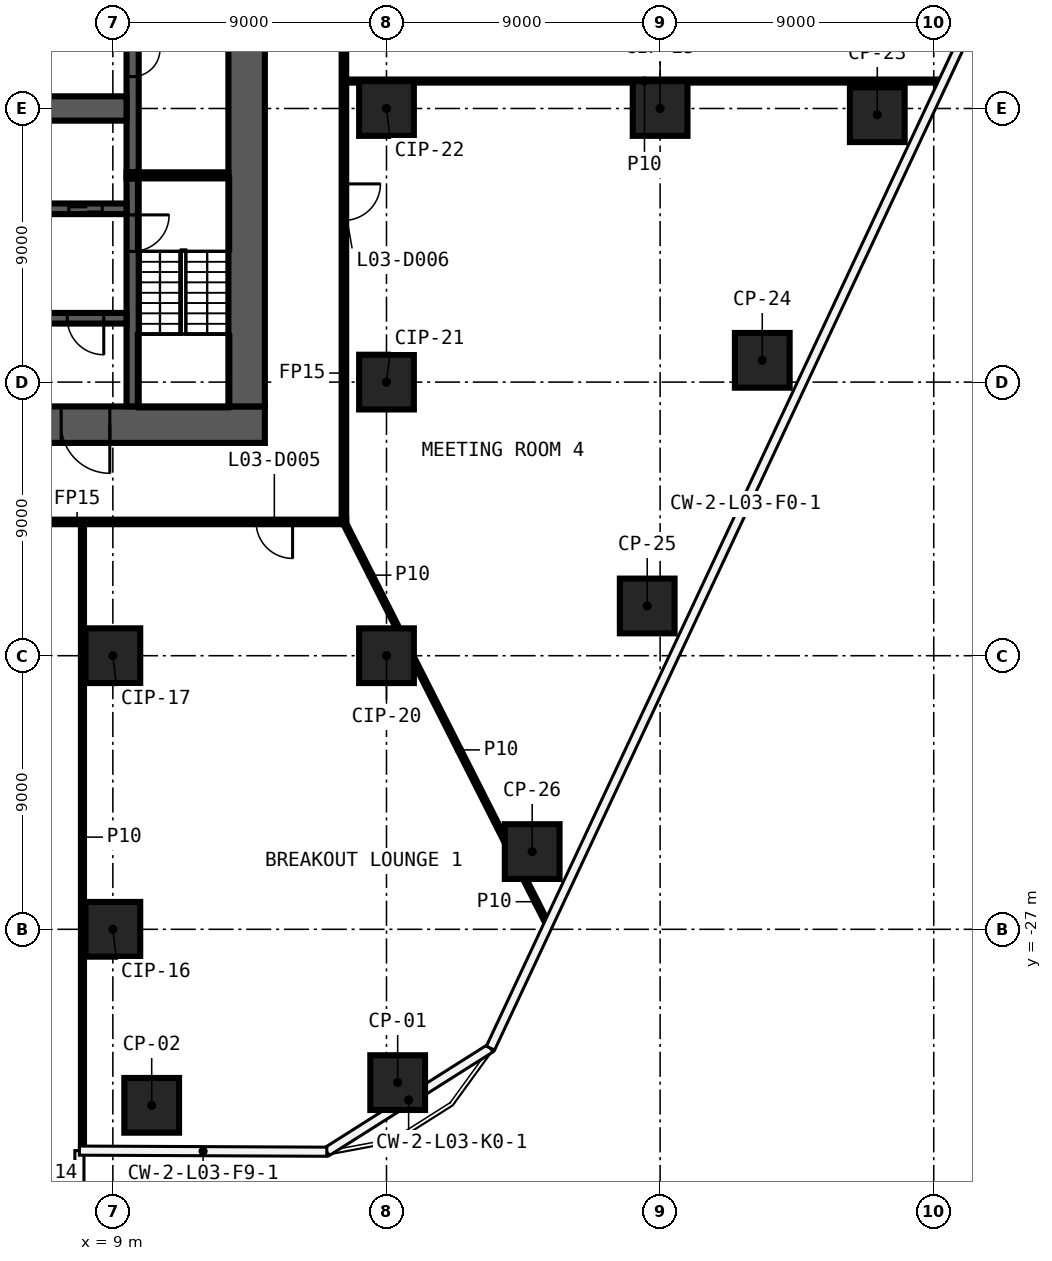
"""IFC4 building model, lengths in metres.
Left out: names, types, materials, properties, quantities, classifications, styles, units other than length and angle.
Written with IfcOpenShell. Run it as: python <this file> out.ifc"""

import sys

from ifc_helpers import new_model, si_unit, direction, frame, frame_2d, origin, origin_2d, place, context, subcontext, project, spatial, rectangle, extrude, element, fill, save


model = new_model("IFC4")
c1 = context("Model", 3, precision=1e-05, world=origin(), true_north=direction((0.0, 1.0)))
c2 = subcontext(c1, "Body", "Model", "MODEL_VIEW")
j1 = project(units=[si_unit("LENGTHUNIT", "METRE"), si_unit("PLANEANGLEUNIT", "RADIAN")], contexts=[c1])
p1 = place(None, origin())
s1 = spatial("IfcSite", under=j1, at=p1, CompositionType="ELEMENT")
p2 = place(p1, origin())
s2 = spatial("IfcBuilding", under=s1, at=p2, CompositionType="ELEMENT")
p3 = place(p2, frame((0.0, 0.0, 27.0)))
s3 = spatial("IfcBuildingStorey", under=s2, at=p3, CompositionType="ELEMENT", Elevation=27.0)
for number, where, z_axis, x_axis in (
    (1, (18.368, -32.043, 0.0), (0.0, 0.0, 1.0), (1.0, 0.0, 0.0)),
    (2, (10.277, -32.79, 0.0), (0.0, 0.0, 1.0), (1.0, 0.0, 0.0)),
    (3, (34.143, -0.205, 0.0), (0.0, 0.0, 1.0), (1.0, 0.0, 0.0)),
    (4, (30.36, -8.284, 0.0), (0.0, 0.0, 1.0), (1.0, 0.0, 0.0)),
    (5, (26.576, -16.364, 0.0), (0.0, 0.0, 1.0), (1.0, 0.0, 0.0)),
    (6, (22.792, -24.443, 0.0), (0.0, 0.0, 1.0), (1.0, 0.0, 0.0)),
    (7, (9.0, -27.0, 0.0), (0.0, 0.0, 1.0), (1.0, 0.0, 0.0)),
    (8, (9.0, -18.0, 0.0), (0.0, 0.0, 1.0), (1.0, 0.0, 0.0)),
    (9, (18.0, -18.0, 0.0), (0.0, 0.0, 1.0), (1.0, 0.0, 0.0)),
    (10, (18.0, -9.0, 0.0), (0.0, 0.0, 1.0), (1.0, 0.0, 0.0)),
    (11, (18.0, 0.0, 0.0), (0.0, 0.0, 1.0), (1.0, 0.0, 0.0)),
    (12, (27.0, 0.0, 0.0), (0.0, 0.0, 1.0), (1.0, 0.0, 0.0)),
):
    element("IfcColumn", number, at=place(p3, frame(where, z_axis=z_axis, x_axis=x_axis)), inside=s3, PredefinedType="COLUMN", context=c2, shape_type="SweptSolid", body=[
        extrude(rectangle(XDim=1.8, YDim=1.8, at=origin_2d()), origin(), (0.0, 0.0, 1.0), 5.55),
    ])
p4 = place(p3, frame((16.675, -13.6, 0.0), z_axis=(0.0, 0.0, 1.0), x_axis=(-1.0, 0.0, 0.0)))
e13 = element("IfcWall", 13, at=p4, inside=s3, PredefinedType="PARTITIONING", context=c2, shape_type="SweptSolid", body=[
    extrude(rectangle(XDim=33.35, YDim=0.15, at=frame_2d((16.675, 0.0))), origin(), (0.0, 0.0, 1.0), 5.55),
])
p5 = place(p4, frame((25.853, 0.0, 0.0)))
e14 = element("IfcOpeningElement", 14, at=p5, cuts=e13, PredefinedType="OPENING", context=c2, shape_type="SweptSolid", body=[
    extrude(rectangle(XDim=1.2, YDim=2.1, at=frame_2d((0.6, 1.05))), frame((0.0, 0.085, 0.0), z_axis=(0.0, -1.0, 0.0), x_axis=(1.0, 0.0, 0.0)), (0.0, 0.0, 1.0), 0.17),
])
p6 = place(p4, frame((14.742, 0.0, 0.0)))
e15 = element("IfcOpeningElement", 15, at=p6, cuts=e13, PredefinedType="OPENING", context=c2, shape_type="SweptSolid", body=[
    extrude(rectangle(XDim=1.2, YDim=2.1, at=frame_2d((0.6, 1.05))), frame((0.0, 0.085, 0.0), z_axis=(0.0, -1.0, 0.0), x_axis=(1.0, 0.0, 0.0)), (0.0, 0.0, 1.0), 0.17),
])
p7 = place(p4, frame((1.764, 0.0, 0.0)))
e16 = element("IfcOpeningElement", 16, at=p7, cuts=e13, PredefinedType="OPENING", context=c2, shape_type="SweptSolid", body=[
    extrude(rectangle(XDim=1.2, YDim=2.1, at=frame_2d((0.6, 1.05))), frame((0.0, 0.085, 0.0), z_axis=(0.0, -1.0, 0.0), x_axis=(1.0, 0.0, 0.0)), (0.0, 0.0, 1.0), 0.17),
])
p8 = place(p3, frame((16.675, 0.902, 0.0), z_axis=(0.0, 0.0, 1.0), x_axis=(1.0, 0.0, 0.0)))
e17 = element("IfcWall", 17, at=p8, inside=s3, PredefinedType="PARTITIONING", context=c2, shape_type="SweptSolid", body=[
    extrude(rectangle(XDim=19.621, YDim=0.1, at=frame_2d((9.811, 0.0))), origin(), (0.0, 0.0, 1.0), 5.55),
])
p9 = place(p3, frame((16.6, 13.525, 0.0), z_axis=(0.0, 0.0, 1.0), x_axis=(0.0, -1.0, 0.0)))
e18 = element("IfcWall", 18, at=p9, inside=s3, PredefinedType="PARTITIONING", context=c2, shape_type="SweptSolid", body=[
    extrude(rectangle(XDim=27.05, YDim=0.15, at=frame_2d((13.525, 0.0))), origin(), (0.0, 0.0, 1.0), 5.55),
])
p10 = place(p9, frame((16.006, 0.0, 0.0)))
e19 = element("IfcOpeningElement", 19, at=p10, cuts=e18, PredefinedType="OPENING", context=c2, shape_type="SweptSolid", body=[
    extrude(rectangle(XDim=1.2, YDim=2.1, at=frame_2d((0.6, 1.05))), frame((0.0, 0.085, 0.0), z_axis=(0.0, -1.0, 0.0), x_axis=(1.0, 0.0, 0.0)), (0.0, 0.0, 1.0), 0.17),
])
p11 = place(p9, frame((7.745, 0.0, 0.0)))
e20 = element("IfcOpeningElement", 20, at=p11, cuts=e18, PredefinedType="OPENING", context=c2, shape_type="SweptSolid", body=[
    extrude(rectangle(XDim=1.2, YDim=2.1, at=frame_2d((0.6, 1.05))), frame((0.0, 0.085, 0.0), z_axis=(0.0, -1.0, 0.0), x_axis=(1.0, 0.0, 0.0)), (0.0, 0.0, 1.0), 0.17),
])
p12 = place(p3, frame((8.0, -34.26, 0.0), z_axis=(0.0, 0.0, 1.0), x_axis=(0.0, 1.0, 0.0)))
e21 = element("IfcWall", 21, at=p12, inside=s3, PredefinedType="PARTITIONING", context=c2, shape_type="SweptSolid", body=[
    extrude(rectangle(XDim=20.585, YDim=0.1, at=frame_2d((10.292, 0.0))), origin(), (0.0, 0.0, 1.0), 5.55),
])
p13 = place(p3, frame((16.6, -13.6, 0.0), z_axis=(0.0, 0.0, 1.0), x_axis=(0.451663698234, -0.892188266958, 0.0)))
e22 = element("IfcWall", 22, at=p13, inside=s3, PredefinedType="PARTITIONING", context=c2, shape_type="SweptSolid", body=[
    extrude(rectangle(XDim=3.923, YDim=0.1, at=frame_2d((1.961, 0.0))), origin(), (0.0, 0.0, 1.0), 5.55),
])
p14 = place(p3, frame((18.9, -18.143, 0.0), z_axis=(0.0, 0.0, 1.0), x_axis=(0.451674644957, -0.892182725176, 0.0)))
e23 = element("IfcWall", 23, at=p14, inside=s3, PredefinedType="PARTITIONING", context=c2, shape_type="SweptSolid", body=[
    extrude(rectangle(XDim=6.625, YDim=0.1, at=frame_2d((3.312, 0.0))), origin(), (0.0, 0.0, 1.0), 5.55),
])
p15 = place(p3, frame((22.545, -25.343, 0.0), z_axis=(0.0, 0.0, 1.0), x_axis=(0.451627018025, -0.892206835095, 0.0)))
e24 = element("IfcWall", 24, at=p15, inside=s3, PredefinedType="PARTITIONING", context=c2, shape_type="SweptSolid", body=[
    extrude(rectangle(XDim=1.68, YDim=0.1, at=frame_2d((0.84, 0.0))), origin(), (0.0, 0.0, 1.0), 5.55),
])
p16 = place(p3, frame((14.0, -10.4, 0.0), z_axis=(0.0, 0.0, 1.0), x_axis=(-1.0, 0.0, 0.0)))
e25 = element("IfcWall", 25, at=p16, inside=s3, PredefinedType="SHEAR", context=c2, shape_type="SweptSolid", body=[
    extrude(rectangle(XDim=28.0, YDim=1.2, at=frame_2d((14.0, 0.0))), origin(), (0.0, 0.0, 1.0), 5.55),
])
p17 = place(p16, frame((5.1, 0.0, 0.0)))
e26 = element("IfcOpeningElement", 26, at=p17, cuts=e25, PredefinedType="OPENING", context=c2, shape_type="SweptSolid", body=[
    extrude(rectangle(XDim=1.6, YDim=2.1, at=frame_2d((0.8, 1.05))), frame((0.0, 0.61, 0.0), z_axis=(0.0, -1.0, 0.0), x_axis=(1.0, 0.0, 0.0)), (0.0, 0.0, 1.0), 1.22),
])
p18 = place(p3, frame((13.4, 9.8, 0.0), z_axis=(0.0, 0.0, 1.0), x_axis=(0.0, -1.0, 0.0)))
e27 = element("IfcWall", 27, at=p18, inside=s3, PredefinedType="SHEAR", context=c2, shape_type="SweptSolid", body=[
    extrude(rectangle(XDim=19.6, YDim=1.2, at=frame_2d((9.8, 0.0))), origin(), (0.0, 0.0, 1.0), 5.55),
])
p19 = place(p3, frame((9.65, -2.3, 0.0), z_axis=(0.0, 0.0, 1.0), x_axis=(0.0, -1.0, 0.0)))
e28 = element("IfcWall", 28, at=p19, inside=s3, PredefinedType="SHEAR", context=c2, shape_type="SweptSolid", body=[
    extrude(rectangle(XDim=7.5, YDim=0.4, at=frame_2d((3.75, 0.0))), origin(), (0.0, 0.0, 1.0), 5.55),
])
p20 = place(p19, frame((1.2, 0.0, 0.0)))
e29 = element("IfcOpeningElement", 29, at=p20, cuts=e28, PredefinedType="OPENING", context=c2, shape_type="SweptSolid", body=[
    extrude(rectangle(XDim=1.2, YDim=2.1, at=frame_2d((0.6, 1.05))), frame((0.0, 0.21, 0.0), z_axis=(0.0, -1.0, 0.0), x_axis=(1.0, 0.0, 0.0)), (0.0, 0.0, 1.0), 0.42),
])
p21 = place(p3, frame((9.65, 2.1, 0.0), z_axis=(0.0, 0.0, 1.0), x_axis=(0.0, -1.0, 0.0)))
e30 = element("IfcWall", 30, at=p21, inside=s3, PredefinedType="SHEAR", context=c2, shape_type="SweptSolid", body=[
    extrude(rectangle(XDim=4.2, YDim=0.4, at=frame_2d((2.1, 0.0))), origin(), (0.0, 0.0, 1.0), 5.55),
])
p22 = place(p21, frame((0.15, 0.0, 0.0)))
e31 = element("IfcOpeningElement", 31, at=p22, cuts=e30, PredefinedType="OPENING", context=c2, shape_type="SweptSolid", body=[
    extrude(rectangle(XDim=0.9, YDim=2.1, at=frame_2d((0.45, 1.05))), frame((0.0, 0.21, 0.0), z_axis=(0.0, -1.0, 0.0), x_axis=(1.0, 0.0, 0.0)), (0.0, 0.0, 1.0), 0.42),
])
p23 = place(p3, frame((9.45, -2.2, 0.0), z_axis=(0.0, 0.0, 1.0), x_axis=(1.0, 0.0, 0.0)))
e32 = element("IfcWall", 32, at=p23, inside=s3, PredefinedType="SHEAR", context=c2, shape_type="SweptSolid", body=[
    extrude(rectangle(XDim=3.35, YDim=0.2, at=frame_2d((1.675, 0.0))), origin(), (0.0, 0.0, 1.0), 5.55),
])
p24 = place(p3, frame((-9.45, -3.3, 0.0), z_axis=(0.0, 0.0, 1.0), x_axis=(1.0, 0.0, 0.0)))
e33 = element("IfcWall", 33, at=p24, inside=s3, PredefinedType="SHEAR", context=c2, shape_type="SweptSolid", body=[
    extrude(rectangle(XDim=18.9, YDim=0.35, at=frame_2d((9.45, 0.0))), origin(), (0.0, 0.0, 1.0), 5.55),
])
p25 = place(p24, frame((17.0, 0.0, 0.0)))
e34 = element("IfcOpeningElement", 34, at=p25, cuts=e33, PredefinedType="OPENING", context=c2, shape_type="SweptSolid", body=[
    extrude(rectangle(XDim=1.1, YDim=2.1, at=frame_2d((0.55, 1.05))), frame((0.0, 0.185, 0.0), z_axis=(0.0, -1.0, 0.0), x_axis=(1.0, 0.0, 0.0)), (0.0, 0.0, 1.0), 0.37),
])
p26 = place(p24, frame((0.9, 0.0, 0.0)))
e35 = element("IfcOpeningElement", 35, at=p26, cuts=e33, PredefinedType="OPENING", context=c2, shape_type="SweptSolid", body=[
    extrude(rectangle(XDim=0.9, YDim=2.1, at=frame_2d((0.45, 1.05))), frame((0.0, 0.185, 0.0), z_axis=(0.0, -1.0, 0.0), x_axis=(1.0, 0.0, 0.0)), (0.0, 0.0, 1.0), 0.37),
])
p27 = place(p24, frame((3.6, 0.0, 0.0)))
e36 = element("IfcOpeningElement", 36, at=p27, cuts=e33, PredefinedType="OPENING", context=c2, shape_type="SweptSolid", body=[
    extrude(rectangle(XDim=0.9, YDim=2.1, at=frame_2d((0.45, 1.05))), frame((0.0, 0.185, 0.0), z_axis=(0.0, -1.0, 0.0), x_axis=(1.0, 0.0, 0.0)), (0.0, 0.0, 1.0), 0.37),
])
p28 = place(p24, frame((6.3, 0.0, 0.0)))
e37 = element("IfcOpeningElement", 37, at=p28, cuts=e33, PredefinedType="OPENING", context=c2, shape_type="SweptSolid", body=[
    extrude(rectangle(XDim=0.9, YDim=2.1, at=frame_2d((0.45, 1.05))), frame((0.0, 0.185, 0.0), z_axis=(0.0, -1.0, 0.0), x_axis=(1.0, 0.0, 0.0)), (0.0, 0.0, 1.0), 0.37),
])
p29 = place(p24, frame((9.0, 0.0, 0.0)))
e38 = element("IfcOpeningElement", 38, at=p29, cuts=e33, PredefinedType="OPENING", context=c2, shape_type="SweptSolid", body=[
    extrude(rectangle(XDim=0.9, YDim=2.1, at=frame_2d((0.45, 1.05))), frame((0.0, 0.185, 0.0), z_axis=(0.0, -1.0, 0.0), x_axis=(1.0, 0.0, 0.0)), (0.0, 0.0, 1.0), 0.37),
])
p30 = place(p3, frame((9.45, -6.9, 0.0), z_axis=(0.0, 0.0, 1.0), x_axis=(-1.0, 0.0, 0.0)))
e39 = element("IfcWall", 39, at=p30, inside=s3, PredefinedType="SHEAR", context=c2, shape_type="SweptSolid", body=[
    extrude(rectangle(XDim=18.9, YDim=0.35, at=frame_2d((9.45, 0.0))), origin(), (0.0, 0.0, 1.0), 5.55),
])
p31 = place(p30, frame((0.75, 0.0, 0.0)))
e40 = element("IfcOpeningElement", 40, at=p31, cuts=e39, PredefinedType="OPENING", context=c2, shape_type="SweptSolid", body=[
    extrude(rectangle(XDim=1.2, YDim=2.1, at=frame_2d((0.6, 1.05))), frame((0.0, 0.185, 0.0), z_axis=(0.0, -1.0, 0.0), x_axis=(1.0, 0.0, 0.0)), (0.0, 0.0, 1.0), 0.37),
])
p32 = place(p30, frame((17.1, 0.0, 0.0)))
e41 = element("IfcOpeningElement", 41, at=p32, cuts=e39, PredefinedType="OPENING", context=c2, shape_type="SweptSolid", body=[
    extrude(rectangle(XDim=0.9, YDim=2.1, at=frame_2d((0.45, 1.05))), frame((0.0, 0.185, 0.0), z_axis=(0.0, -1.0, 0.0), x_axis=(1.0, 0.0, 0.0)), (0.0, 0.0, 1.0), 0.37),
])
p33 = place(p30, frame((13.05, 0.0, 0.0)))
e42 = element("IfcOpeningElement", 42, at=p33, cuts=e39, PredefinedType="OPENING", context=c2, shape_type="SweptSolid", body=[
    extrude(rectangle(XDim=0.9, YDim=2.1, at=frame_2d((0.45, 1.05))), frame((0.0, 0.185, 0.0), z_axis=(0.0, -1.0, 0.0), x_axis=(1.0, 0.0, 0.0)), (0.0, 0.0, 1.0), 0.37),
])
p34 = place(p30, frame((9.0, 0.0, 0.0)))
e43 = element("IfcOpeningElement", 43, at=p34, cuts=e39, PredefinedType="OPENING", context=c2, shape_type="SweptSolid", body=[
    extrude(rectangle(XDim=0.9, YDim=2.1, at=frame_2d((0.45, 1.05))), frame((0.0, 0.185, 0.0), z_axis=(0.0, -1.0, 0.0), x_axis=(1.0, 0.0, 0.0)), (0.0, 0.0, 1.0), 0.37),
])
p35 = place(p3, frame((-9.45, 0.0, 0.0), z_axis=(0.0, 0.0, 1.0), x_axis=(1.0, 0.0, 0.0)))
e44 = element("IfcWall", 44, at=p35, inside=s3, PredefinedType="SHEAR", context=c2, shape_type="SweptSolid", body=[
    extrude(rectangle(XDim=18.9, YDim=0.8, at=frame_2d((9.45, 0.0))), origin(), (0.0, 0.0, 1.0), 5.55),
])
p36 = place(p7, origin())
e45 = element("IfcDoor", 45, at=p36, inside=s3, OperationType="SINGLE_SWING_RIGHT", PredefinedType="DOOR", context=c2, shape_type="SweptSolid", body=[
    extrude(rectangle(XDim=1.2, YDim=2.1, at=frame_2d((0.6, 1.05))), frame((0.0, 0.025, 0.0), z_axis=(0.0, -1.0, 0.0), x_axis=(1.0, 0.0, 0.0)), (0.0, 0.0, 1.0), 0.05),
])
fill(e16, e45)
p37 = place(p10, origin())
e46 = element("IfcDoor", 46, at=p37, inside=s3, OperationType="SINGLE_SWING_LEFT", PredefinedType="DOOR", context=c2, shape_type="SweptSolid", body=[
    extrude(rectangle(XDim=1.2, YDim=2.1, at=frame_2d((0.6, 1.05))), frame((0.0, 0.025, 0.0), z_axis=(0.0, -1.0, 0.0), x_axis=(1.0, 0.0, 0.0)), (0.0, 0.0, 1.0), 0.05),
])
fill(e19, e46)
p38 = place(p22, origin())
e47 = element("IfcDoor", 47, at=p38, inside=s3, OperationType="SINGLE_SWING_RIGHT", PredefinedType="DOOR", context=c2, shape_type="SweptSolid", body=[
    extrude(rectangle(XDim=0.9, YDim=2.1, at=frame_2d((0.45, 1.05))), frame((0.0, 0.025, 0.0), z_axis=(0.0, -1.0, 0.0), x_axis=(1.0, 0.0, 0.0)), (0.0, 0.0, 1.0), 0.05),
])
fill(e31, e47)
p39 = place(p25, origin())
e48 = element("IfcDoor", 48, at=p39, inside=s3, OperationType="DOUBLE_DOOR_SLIDING", PredefinedType="DOOR", context=c2, shape_type="SweptSolid", body=[
    extrude(rectangle(XDim=1.1, YDim=2.1, at=frame_2d((0.55, 1.05))), frame((0.0, 0.025, 0.0), z_axis=(0.0, -1.0, 0.0), x_axis=(1.0, 0.0, 0.0)), (0.0, 0.0, 1.0), 0.05),
])
fill(e34, e48)
p40 = place(p17, origin())
e49 = element("IfcDoor", 49, at=p40, inside=s3, OperationType="DOUBLE_DOOR_SINGLE_SWING", PredefinedType="DOOR", context=c2, shape_type="SweptSolid", body=[
    extrude(rectangle(XDim=1.6, YDim=2.1, at=frame_2d((0.8, 1.05))), frame((0.0, 0.025, 0.0), z_axis=(0.0, -1.0, 0.0), x_axis=(1.0, 0.0, 0.0)), (0.0, 0.0, 1.0), 0.05),
])
fill(e26, e49)
p41 = place(p31, origin())
e50 = element("IfcDoor", 50, at=p41, inside=s3, OperationType="SINGLE_SWING_LEFT", PredefinedType="DOOR", context=c2, shape_type="SweptSolid", body=[
    extrude(rectangle(XDim=1.2, YDim=2.1, at=frame_2d((0.6, 1.05))), frame((0.0, 0.025, 0.0), z_axis=(0.0, -1.0, 0.0), x_axis=(1.0, 0.0, 0.0)), (0.0, 0.0, 1.0), 0.05),
])
fill(e40, e50)
p42 = place(p20, origin())
e51 = element("IfcDoor", 51, at=p42, inside=s3, OperationType="SINGLE_SWING_RIGHT", PredefinedType="DOOR", context=c2, shape_type="SweptSolid", body=[
    extrude(rectangle(XDim=1.2, YDim=2.1, at=frame_2d((0.6, 1.05))), frame((0.0, 0.025, 0.0), z_axis=(0.0, -1.0, 0.0), x_axis=(1.0, 0.0, 0.0)), (0.0, 0.0, 1.0), 0.05),
])
fill(e29, e51)
save(model, sys.argv[1])
